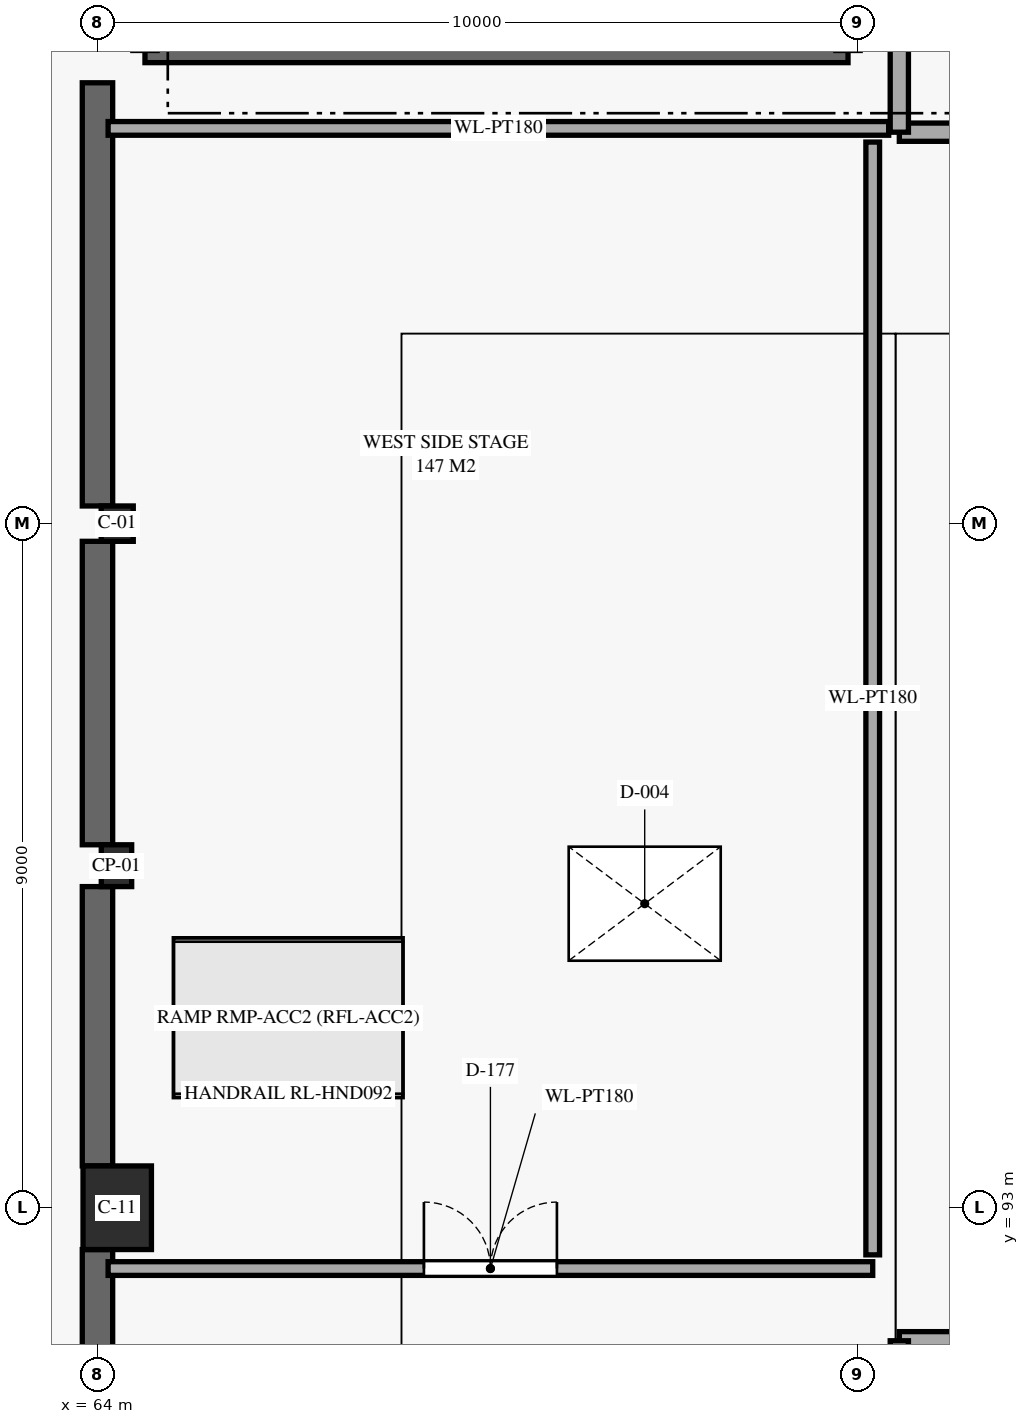
"""IFC4 building model, lengths in metres.
Left out: names, types, materials, properties, quantities, classifications, styles, units other than length and angle.
Written with IfcOpenShell. Run it as: python <this file> out.ifc"""

import sys

from ifc_helpers import new_model, si_unit, direction, frame, frame_2d, origin, origin_2d, place, context, subcontext, project, spatial, rectangle, i_section, extrude, element, fill, save


model = new_model("IFC4")
c1 = context("Model", 3, precision=1e-05, world=origin(), true_north=direction((0.0, 1.0)))
c2 = subcontext(c1, "Body", "Model", "MODEL_VIEW")
j1 = project(units=[si_unit("LENGTHUNIT", "METRE"), si_unit("PLANEANGLEUNIT", "RADIAN")], contexts=[c1])
p1 = place(None, origin())
s1 = spatial("IfcSite", under=j1, at=p1, CompositionType="ELEMENT")
p2 = place(p1, origin())
s2 = spatial("IfcBuilding", under=s1, at=p2, CompositionType="ELEMENT")
p3 = place(p2, origin())
s3 = spatial("IfcBuildingStorey", under=s2, at=p3, CompositionType="ELEMENT", Elevation=0.0)
p4 = place(p3, frame((64.25, 97.5, 0.0), z_axis=(0.0, 0.0, 1.0), x_axis=(1.0, 0.0, 0.0)))
e1 = element("IfcColumn", 1, at=p4, inside=s3, PredefinedType="PILASTER", context=c2, shape_type="SweptSolid", body=[
    extrude(rectangle(XDim=0.4, YDim=0.55, at=origin_2d()), origin(), (0.0, 0.0, 1.0), 5.0),
])
p5 = place(p3, frame((64.26, 93.0, 0.0), z_axis=(0.0, 0.0, 1.0), x_axis=(1.0, 0.0, 0.0)))
e2 = element("IfcColumn", 2, at=p5, inside=s3, PredefinedType="COLUMN", context=c2, shape_type="SweptSolid", body=[
    extrude(rectangle(XDim=0.9, YDim=1.1, at=origin_2d()), origin(), (0.0, 0.0, 1.0), 5.0),
])
p6 = place(p3, frame((64.26, 102.0, 0.0), z_axis=(0.0, 0.0, 1.0), x_axis=(1.0, 0.0, 0.0)))
e3 = element("IfcColumn", 3, at=p6, inside=s3, PredefinedType="COLUMN", context=c2, shape_type="SweptSolid", body=[
    extrude(i_section(OverallWidth=0.422, OverallDepth=0.465, WebThickness=0.045, FlangeThickness=0.073, FilletRadius=0.02, at=origin_2d()), origin(), (0.0, 0.0, 1.0), 5.0),
])
p7 = place(p3, frame((64.625, 108.225, 0.0), z_axis=(0.0, 0.0, 1.0), x_axis=(1.0, 0.0, 0.0)))
e4 = element("IfcWall", 4, at=p7, inside=s3, PredefinedType="SHEAR", context=c2, shape_type="SweptSolid", body=[
    extrude(rectangle(XDim=9.25, YDim=0.32, at=frame_2d((4.625, 0.0))), origin(), (0.0, 0.0, 1.0), 4.675),
])
p8 = place(p3, frame((74.55, 91.25, 0.0), z_axis=(0.0, 0.0, 1.0), x_axis=(1.0, 0.0, 0.0)))
e5 = element("IfcWall", 5, at=p8, inside=s3, PredefinedType="SOLIDWALL", context=c2, shape_type="SweptSolid", body=[
    extrude(rectangle(XDim=4.8, YDim=0.24, at=frame_2d((2.4, 0.0))), origin(), (0.0, 0.0, 1.0), 4.675),
])
p9 = place(p8, frame((1.2, 0.0, 0.0)))
e6 = element("IfcOpeningElement", 6, at=p9, cuts=e5, PredefinedType="OPENING", context=c2, shape_type="SweptSolid", body=[
    extrude(rectangle(XDim=1.6, YDim=2.2, at=frame_2d((0.8, 1.1))), frame((0.0, 0.13, 0.0), z_axis=(0.0, -1.0, 0.0), x_axis=(1.0, 0.0, 0.0)), (0.0, 0.0, 1.0), 0.26),
])
p10 = place(p3, frame((74.55, 91.25, 0.0), z_axis=(0.0, 0.0, 1.0), x_axis=(0.0, -1.0, 0.0)))
e7 = element("IfcWall", 7, at=p10, inside=s3, PredefinedType="SOLIDWALL", context=c2, shape_type="SweptSolid", body=[
    extrude(rectangle(XDim=3.8, YDim=0.24, at=frame_2d((1.9, 0.0))), origin(), (0.0, 0.0, 1.0), 4.675),
])
p11 = place(p3, frame((74.55, 107.15, 0.0), z_axis=(0.0, 0.0, 1.0), x_axis=(1.0, 0.0, 0.0)))
e8 = element("IfcWall", 8, at=p11, inside=s3, PredefinedType="SOLIDWALL", context=c2, shape_type="SweptSolid", body=[
    extrude(rectangle(XDim=4.8, YDim=0.24, at=frame_2d((2.4, 0.0))), origin(), (0.0, 0.0, 1.0), 4.675),
])
p12 = place(p11, frame((1.2, 0.0, 0.0)))
e9 = element("IfcOpeningElement", 9, at=p12, cuts=e8, PredefinedType="OPENING", context=c2, shape_type="SweptSolid", body=[
    extrude(rectangle(XDim=1.6, YDim=2.2, at=frame_2d((0.8, 1.1))), frame((0.0, 0.13, 0.0), z_axis=(0.0, -1.0, 0.0), x_axis=(1.0, 0.0, 0.0)), (0.0, 0.0, 1.0), 0.26),
])
p13 = place(p3, frame((74.55, 110.95, 0.0), z_axis=(0.0, 0.0, 1.0), x_axis=(0.0, -1.0, 0.0)))
e10 = element("IfcWall", 10, at=p13, inside=s3, PredefinedType="SOLIDWALL", context=c2, shape_type="SweptSolid", body=[
    extrude(rectangle(XDim=3.8, YDim=0.24, at=frame_2d((1.9, 0.0))), origin(), (0.0, 0.0, 1.0), 4.675),
])
p14 = place(p3, frame((64.0, 90.2, 0.0), z_axis=(0.0, 0.0, 1.0), x_axis=(0.0, 1.0, 0.0)))
e11 = element("IfcWall", 11, at=p14, inside=s3, PredefinedType="SHEAR", context=c2, shape_type="SweptSolid", body=[
    extrude(rectangle(XDim=2.25, YDim=0.4, at=frame_2d((1.125, 0.0))), origin(), (0.0, 0.0, 1.0), 4.675),
])
p15 = place(p3, frame((64.0, 93.55, 0.0), z_axis=(0.0, 0.0, 1.0), x_axis=(0.0, 1.0, 0.0)))
e12 = element("IfcWall", 12, at=p15, inside=s3, PredefinedType="SHEAR", context=c2, shape_type="SweptSolid", body=[
    extrude(rectangle(XDim=3.675, YDim=0.4, at=frame_2d((1.837, 0.0))), origin(), (0.0, 0.0, 1.0), 4.675),
])
p16 = place(p3, frame((64.0, 97.775, 0.0), z_axis=(0.0, 0.0, 1.0), x_axis=(0.0, 1.0, 0.0)))
e13 = element("IfcWall", 13, at=p16, inside=s3, PredefinedType="SHEAR", context=c2, shape_type="SweptSolid", body=[
    extrude(rectangle(XDim=3.993, YDim=0.4, at=frame_2d((1.996, 0.0))), origin(), (0.0, 0.0, 1.0), 4.675),
])
p17 = place(p3, frame((64.0, 102.232, 0.0), z_axis=(0.0, 0.0, 1.0), x_axis=(0.0, 1.0, 0.0)))
e14 = element("IfcWall", 14, at=p17, inside=s3, PredefinedType="SHEAR", context=c2, shape_type="SweptSolid", body=[
    extrude(rectangle(XDim=5.568, YDim=0.4, at=frame_2d((2.784, 0.0))), origin(), (0.0, 0.0, 1.0), 4.675),
])
p18 = place(p3, frame((64.14, 92.2, 0.0), z_axis=(0.0, 0.0, 1.0), x_axis=(1.0, 0.0, 0.0)))
e15 = element("IfcWall", 15, at=p18, inside=s3, PredefinedType="PARTITIONING", context=c2, shape_type="SweptSolid", body=[
    extrude(rectangle(XDim=10.06, YDim=0.18, at=frame_2d((5.03, 0.0))), origin(), (0.0, 0.0, 1.0), 4.675),
])
p19 = place(p18, frame((4.155, 0.0, 0.0)))
e16 = element("IfcOpeningElement", 16, at=p19, cuts=e15, PredefinedType="OPENING", context=c2, shape_type="SweptSolid", body=[
    extrude(rectangle(XDim=1.75, YDim=2.2, at=frame_2d((0.875, 1.1))), frame((0.0, 0.1, 0.0), z_axis=(0.0, -1.0, 0.0), x_axis=(1.0, 0.0, 0.0)), (0.0, 0.0, 1.0), 0.2),
])
p20 = place(p3, frame((74.41, 107.2, 0.0), z_axis=(0.0, 0.0, 1.0), x_axis=(-1.0, 0.0, 0.0)))
e17 = element("IfcWall", 17, at=p20, inside=s3, PredefinedType="PARTITIONING", context=c2, shape_type="SweptSolid", body=[
    extrude(rectangle(XDim=10.27, YDim=0.18, at=frame_2d((5.135, 0.0))), origin(), (0.0, 0.0, 1.0), 4.675),
])
p21 = place(p3, frame((74.2, 92.38, 0.0), z_axis=(0.0, 0.0, 1.0), x_axis=(0.0, 1.0, 0.0)))
e18 = element("IfcWall", 18, at=p21, inside=s3, PredefinedType="PARTITIONING", context=c2, shape_type="SweptSolid", body=[
    extrude(rectangle(XDim=14.64, YDim=0.18, at=frame_2d((7.32, 0.0))), origin(), (0.0, 0.0, 1.0), 3.573),
])
p22 = place(p3, origin())
p23 = place(p22, frame((71.2, 97.0, 0.0)))
p24 = place(p23, frame((0.0, 0.0, 0.18)))
e19 = element("IfcDoor", 19, at=p24, inside=s3, OperationType="SINGLE_SWING_RIGHT", PredefinedType="TRAPDOOR", context=c2, shape_type="SweptSolid", body=[
    extrude(rectangle(XDim=2.0, YDim=1.5, at=origin_2d()), origin(), (0.0, 0.0, 1.0), 0.05),
])
p25 = place(p19, origin())
e20 = element("IfcDoor", 20, at=p25, inside=s3, OperationType="DOUBLE_DOOR_SINGLE_SWING", PredefinedType="DOOR", context=c2, shape_type="SweptSolid", body=[
    extrude(rectangle(XDim=1.75, YDim=2.2, at=frame_2d((0.875, 1.1))), frame((0.0, 0.025, 0.0), z_axis=(0.0, -1.0, 0.0), x_axis=(1.0, 0.0, 0.0)), (0.0, 0.0, 1.0), 0.05),
])
fill(e16, e20)
save(model, sys.argv[1])
